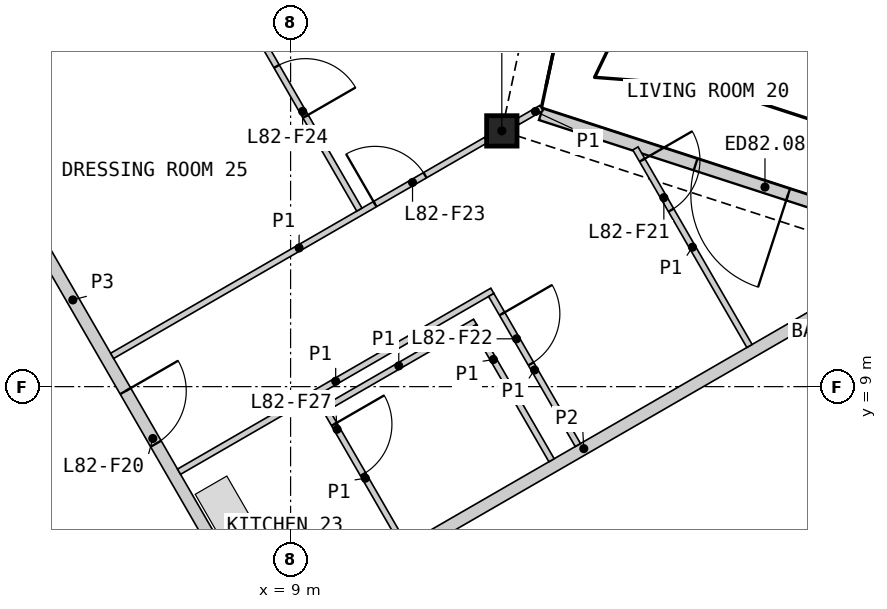
"""IFC4 building model, lengths in metres.
Left out: names, types, materials, properties, quantities, classifications, styles, units other than length and angle.
Written with IfcOpenShell. Run it as: python <this file> out.ifc"""

import sys

from ifc_helpers import new_model, si_unit, direction, frame, frame_2d, origin, origin_2d, place, context, subcontext, project, spatial, polyline, rectangle, hollow_rectangle, outline, extrude, element, fill, save


model = new_model("IFC4")
c1 = context("Model", 3, precision=1e-05, world=origin(), true_north=direction((0.0, 1.0)))
c2 = subcontext(c1, "Body", "Model", "MODEL_VIEW")
j1 = project(units=[si_unit("LENGTHUNIT", "METRE"), si_unit("PLANEANGLEUNIT", "RADIAN")], contexts=[c1])
p1 = place(None, origin())
s1 = spatial("IfcSite", under=j1, at=p1, CompositionType="ELEMENT")
p2 = place(p1, origin())
s2 = spatial("IfcBuilding", under=s1, at=p2, CompositionType="ELEMENT")
p3 = place(p2, frame((0.0, 0.0, 367.8)))
s3 = spatial("IfcBuildingStorey", under=s2, at=p3, CompositionType="ELEMENT", Elevation=367.8)
p4 = place(p3, frame((12.474, 13.206, 0.0), z_axis=(0.0, 0.0, 1.0), x_axis=(1.0, 0.0, 0.0)))
e1 = element("IfcColumn", 1, at=p4, inside=s3, PredefinedType="COLUMN", context=c2, shape_type="SweptSolid", body=[
    extrude(hollow_rectangle(XDim=0.5, YDim=0.5, WallThickness=0.03, at=origin_2d()), origin(), (0.0, 0.0, 1.0), 3.4),
])
p5 = place(p3, frame((19.467, 11.416, 0.0), z_axis=(0.0, 0.0, 1.0), x_axis=(-0.951057706878, 0.309013330114, 0.0)))
e2 = element("IfcWall", 2, at=p5, inside=s3, PredefinedType="SOLIDWALL", context=c2, shape_type="SweptSolid", body=[
    extrude(rectangle(XDim=6.678, YDim=0.2, at=frame_2d((3.339, 0.0))), origin(), (0.0, 0.0, 1.0), 2.634),
])
p6 = place(p5, frame((2.402, 0.0, 0.0)))
e3 = element("IfcOpeningElement", 3, at=p6, cuts=e2, PredefinedType="OPENING", context=c2, shape_type="SweptSolid", body=[
    extrude(rectangle(XDim=1.6, YDim=2.25, at=frame_2d((0.8, 1.125))), frame((0.0, 0.11, 0.0), z_axis=(0.0, -1.0, 0.0), x_axis=(1.0, 0.0, 0.0)), (0.0, 0.0, 1.0), 0.22),
])
p7 = place(p3, origin())
e4 = element("IfcWall", 4, at=p7, inside=s3, PredefinedType="SHEAR", context=c2, shape_type="SweptSolid", body=[
    extrude(outline(polyline([(1.561, 6.097), (3.731, 7.35), (8.231, -0.444), (6.061, -1.697), (5.96, -1.524), (7.952, -0.374), (6.952, 1.358), (4.96, 0.208), (4.861, 0.381), (6.852, 1.531), (5.852, 3.263), (3.861, 2.113), (3.76, 2.287), (5.752, 3.437), (4.752, 5.169), (2.76, 4.019), (2.66, 4.192), (4.652, 5.342), (3.652, 7.074), (1.66, 5.924), (1.561, 6.097)])), origin(), (0.0, 0.0, 1.0), 3.1),
])
p8 = place(p3, frame((8.686, -0.634, 0.0), z_axis=(0.0, 0.0, 1.0), x_axis=(-0.50001836461, 0.866014800712, 0.0)))
e5 = element("IfcWall", 5, at=p8, inside=s3, PredefinedType="SHEAR", context=c2, shape_type="SweptSolid", body=[
    extrude(rectangle(XDim=10.451, YDim=0.6, at=frame_2d((5.225, 0.0))), origin(), (0.0, 0.0, 1.0), 3.1),
])
p9 = place(p3, frame((4.403, 12.185, 0.0), z_axis=(0.0, 0.0, 1.0), x_axis=(0.499992155518, -0.866029932751, 0.0)))
e6 = element("IfcWall", 6, at=p9, inside=s3, PredefinedType="PARTITIONING", context=c2, shape_type="SweptSolid", body=[
    extrude(rectangle(XDim=8.123, YDim=0.2, at=frame_2d((4.062, 0.0))), origin(), (0.0, 0.0, 1.0), 3.1),
])
p10 = place(p9, frame((3.762, 0.0, 0.0)))
e7 = element("IfcOpeningElement", 7, at=p10, cuts=e6, PredefinedType="OPENING", context=c2, shape_type="SweptSolid", body=[
    extrude(rectangle(XDim=1.0, YDim=2.1, at=frame_2d((0.5, 1.05))), frame((0.0, 0.11, 0.0), z_axis=(0.0, -1.0, 0.0), x_axis=(1.0, 0.0, 0.0)), (0.0, 0.0, 1.0), 0.22),
])
p11 = place(p3, frame((8.775, 5.066, 0.0), z_axis=(0.0, 0.0, 1.0), x_axis=(0.866023724155, 0.500002909193, 0.0)))
e8 = element("IfcWall", 8, at=p11, inside=s3, PredefinedType="PARTITIONING", context=c2, shape_type="SweptSolid", body=[
    extrude(rectangle(XDim=11.655, YDim=0.2, at=frame_2d((5.827, 0.0))), origin(), (0.0, 0.0, 1.0), 2.33),
])
p12 = place(p3, frame((3.465, 14.01, 0.0), z_axis=(0.0, 0.0, 1.0), x_axis=(0.866032376801, 0.499987922186, 0.0)))
e9 = element("IfcWall", 9, at=p12, inside=s3, PredefinedType="PARTITIONING", context=c2, shape_type="SweptSolid", body=[
    extrude(rectangle(XDim=11.782, YDim=0.1, at=frame_2d((5.891, 0.0))), origin(), (0.0, 0.0, 1.0), 2.33),
])
p13 = place(p12, frame((6.67, 0.0, 0.0)))
e10 = element("IfcOpeningElement", 10, at=p13, cuts=e9, PredefinedType="OPENING", context=c2, shape_type="SweptSolid", body=[
    extrude(rectangle(XDim=0.95, YDim=2.1, at=frame_2d((0.475, 1.05))), frame((0.0, 0.06, 0.0), z_axis=(0.0, -1.0, 0.0), x_axis=(1.0, 0.0, 0.0)), (0.0, 0.0, 1.0), 0.12),
])
p14 = place(p3, frame((6.065, 9.506, 0.0), z_axis=(0.0, 0.0, 1.0), x_axis=(0.866018949465, 0.500011179042, 0.0)))
e11 = element("IfcWall", 11, at=p14, inside=s3, PredefinedType="PARTITIONING", context=c2, shape_type="SweptSolid", body=[
    extrude(rectangle(XDim=7.1, YDim=0.1, at=frame_2d((3.55, 0.0))), origin(), (0.0, 0.0, 1.0), 2.33),
])
p15 = place(p14, frame((4.992, 0.0, 0.0)))
e12 = element("IfcOpeningElement", 12, at=p15, cuts=e11, PredefinedType="OPENING", context=c2, shape_type="SweptSolid", body=[
    extrude(rectangle(XDim=0.95, YDim=2.1, at=frame_2d((0.475, 1.05))), frame((0.0, 0.06, 0.0), z_axis=(0.0, -1.0, 0.0), x_axis=(1.0, 0.0, 0.0)), (0.0, 0.0, 1.0), 0.12),
])
p16 = place(p3, frame((7.165, 7.601, 0.0), z_axis=(0.0, 0.0, 1.0), x_axis=(0.866017493347, 0.500013701029, 0.0)))
e13 = element("IfcWall", 13, at=p16, inside=s3, PredefinedType="PARTITIONING", context=c2, shape_type="SweptSolid", body=[
    extrude(rectangle(XDim=5.95, YDim=0.1, at=frame_2d((2.975, 0.0))), origin(), (0.0, 0.0, 1.0), 2.33),
])
p17 = place(p3, frame((7.581, 16.328, 0.0), z_axis=(0.0, 0.0, 1.0), x_axis=(0.500005610874, -0.86602216432, 0.0)))
e14 = element("IfcWall", 14, at=p17, inside=s3, PredefinedType="PARTITIONING", context=c2, shape_type="SweptSolid", body=[
    extrude(rectangle(XDim=5.1, YDim=0.1, at=frame_2d((2.55, 0.0))), origin(), (0.0, 0.0, 1.0), 2.33),
])
p18 = place(p17, frame((2.379, 0.0, 0.0)))
e15 = element("IfcOpeningElement", 15, at=p18, cuts=e14, PredefinedType="OPENING", context=c2, shape_type="SweptSolid", body=[
    extrude(rectangle(XDim=0.95, YDim=2.1, at=frame_2d((0.475, 1.05))), frame((0.0, 0.06, 0.0), z_axis=(0.0, -1.0, 0.0), x_axis=(1.0, 0.0, 0.0)), (0.0, 0.0, 1.0), 0.12),
])
p19 = place(p3, frame((14.671, 12.918, 0.0), z_axis=(0.0, 0.0, 1.0), x_axis=(0.499981580887, -0.866036037803, 0.0)))
e16 = element("IfcWall", 16, at=p19, inside=s3, PredefinedType="PARTITIONING", context=c2, shape_type="SweptSolid", body=[
    extrude(rectangle(XDim=3.752, YDim=0.1, at=frame_2d((1.876, 0.0))), origin(), (0.0, 0.0, 1.0), 2.33),
])
p20 = place(p19, frame((0.222, 0.0, 0.0)))
e17 = element("IfcOpeningElement", 17, at=p20, cuts=e16, PredefinedType="OPENING", context=c2, shape_type="SweptSolid", body=[
    extrude(rectangle(XDim=0.95, YDim=2.1, at=frame_2d((0.475, 1.05))), frame((0.0, 0.06, 0.0), z_axis=(0.0, -1.0, 0.0), x_axis=(1.0, 0.0, 0.0)), (0.0, 0.0, 1.0), 0.12),
])
p21 = place(p3, frame((12.3, 10.508, 0.0), z_axis=(0.0, 0.0, 1.0), x_axis=(0.499999279071, -0.866025820012, 0.0)))
e18 = element("IfcWall", 18, at=p21, inside=s3, PredefinedType="PARTITIONING", context=c2, shape_type="SweptSolid", body=[
    extrude(rectangle(XDim=2.85, YDim=0.1, at=frame_2d((1.425, 0.0))), origin(), (0.0, 0.0, 1.0), 2.33),
])
p22 = place(p21, frame((0.358, 0.0, 0.0)))
e19 = element("IfcOpeningElement", 19, at=p22, cuts=e18, PredefinedType="OPENING", context=c2, shape_type="SweptSolid", body=[
    extrude(rectangle(XDim=0.95, YDim=2.1, at=frame_2d((0.475, 1.05))), frame((0.0, 0.06, 0.0), z_axis=(0.0, -1.0, 0.0), x_axis=(1.0, 0.0, 0.0)), (0.0, 0.0, 1.0), 0.12),
])
p23 = place(p3, frame((9.523, 8.616, 0.0), z_axis=(0.0, 0.0, 1.0), x_axis=(0.866032775405, 0.499987231761, 0.0)))
e20 = element("IfcWall", 20, at=p23, inside=s3, PredefinedType="PARTITIONING", context=c2, shape_type="SweptSolid", body=[
    extrude(rectangle(XDim=2.9, YDim=0.1, at=frame_2d((1.45, 0.0))), origin(), (0.0, 0.0, 1.0), 2.33),
])
p24 = place(p3, frame((12.017, 9.998, 0.0), z_axis=(0.0, 0.0, 1.0), x_axis=(0.499948979701, -0.866054858364, 0.0)))
e21 = element("IfcWall", 21, at=p24, inside=s3, PredefinedType="PARTITIONING", context=c2, shape_type="SweptSolid", body=[
    extrude(rectangle(XDim=2.55, YDim=0.1, at=frame_2d((1.275, 0.0))), origin(), (0.0, 0.0, 1.0), 2.33),
])
p25 = place(p3, frame((9.592, 8.598, 0.0), z_axis=(0.0, 0.0, 1.0), x_axis=(0.499990435942, -0.866030925526, 0.0)))
e22 = element("IfcWall", 22, at=p25, inside=s3, PredefinedType="PARTITIONING", context=c2, shape_type="SweptSolid", body=[
    extrude(rectangle(XDim=2.55, YDim=0.1, at=frame_2d((1.275, 0.0))), origin(), (0.0, 0.0, 1.0), 2.33),
])
p26 = place(p25, frame((0.25, 0.0, 0.0)))
e23 = element("IfcOpeningElement", 23, at=p26, cuts=e22, PredefinedType="OPENING", context=c2, shape_type="SweptSolid", body=[
    extrude(rectangle(XDim=0.95, YDim=2.1, at=frame_2d((0.475, 1.05))), frame((0.0, 0.06, 0.0), z_axis=(0.0, -1.0, 0.0), x_axis=(1.0, 0.0, 0.0)), (0.0, 0.0, 1.0), 0.12),
])
p27 = place(p3, frame((12.734, 13.356, 0.0), z_axis=(0.0, 0.0, 1.0), x_axis=(0.865870279271, 0.500268587336, 0.0)))
e24 = element("IfcWall", 24, at=p27, inside=s3, PredefinedType="PARTITIONING", context=c2, shape_type="SweptSolid", body=[
    extrude(rectangle(XDim=0.451, YDim=0.1, at=frame_2d((0.226, 0.0))), origin(), (0.0, 0.0, 1.0), 2.33),
])
p28 = place(p6, origin())
e25 = element("IfcDoor", 25, at=p28, inside=s3, OperationType="DOUBLE_DOOR_SINGLE_SWING", PredefinedType="DOOR", context=c2, shape_type="SweptSolid", body=[
    extrude(rectangle(XDim=1.6, YDim=2.25, at=frame_2d((0.8, 1.125))), frame((0.0, 0.025, 0.0), z_axis=(0.0, -1.0, 0.0), x_axis=(1.0, 0.0, 0.0)), (0.0, 0.0, 1.0), 0.05),
])
fill(e3, e25)
p29 = place(p10, origin())
e26 = element("IfcDoor", 26, at=p29, inside=s3, OperationType="SINGLE_SWING_LEFT", PredefinedType="DOOR", context=c2, shape_type="SweptSolid", body=[
    extrude(rectangle(XDim=1.0, YDim=2.1, at=frame_2d((0.5, 1.05))), frame((0.0, 0.025, 0.0), z_axis=(0.0, -1.0, 0.0), x_axis=(1.0, 0.0, 0.0)), (0.0, 0.0, 1.0), 0.05),
])
fill(e7, e26)
p30 = place(p20, origin())
e27 = element("IfcDoor", 27, at=p30, inside=s3, OperationType="SINGLE_SWING_LEFT", PredefinedType="DOOR", context=c2, shape_type="SweptSolid", body=[
    extrude(rectangle(XDim=0.95, YDim=2.1, at=frame_2d((0.475, 1.05))), frame((0.0, 0.025, 0.0), z_axis=(0.0, -1.0, 0.0), x_axis=(1.0, 0.0, 0.0)), (0.0, 0.0, 1.0), 0.05),
])
fill(e17, e27)
p31 = place(p22, origin())
e28 = element("IfcDoor", 28, at=p31, inside=s3, OperationType="SINGLE_SWING_LEFT", PredefinedType="DOOR", context=c2, shape_type="SweptSolid", body=[
    extrude(rectangle(XDim=0.95, YDim=2.1, at=frame_2d((0.475, 1.05))), frame((0.0, 0.025, 0.0), z_axis=(0.0, -1.0, 0.0), x_axis=(1.0, 0.0, 0.0)), (0.0, 0.0, 1.0), 0.05),
])
fill(e19, e28)
p32 = place(p15, origin())
e29 = element("IfcDoor", 29, at=p32, inside=s3, OperationType="SINGLE_SWING_LEFT", PredefinedType="DOOR", context=c2, shape_type="SweptSolid", body=[
    extrude(rectangle(XDim=0.95, YDim=2.1, at=frame_2d((0.475, 1.05))), frame((0.0, 0.025, 0.0), z_axis=(0.0, -1.0, 0.0), x_axis=(1.0, 0.0, 0.0)), (0.0, 0.0, 1.0), 0.05),
])
fill(e12, e29)
p33 = place(p18, origin())
e30 = element("IfcDoor", 30, at=p33, inside=s3, OperationType="SINGLE_SWING_RIGHT", PredefinedType="DOOR", context=c2, shape_type="SweptSolid", body=[
    extrude(rectangle(XDim=0.95, YDim=2.1, at=frame_2d((0.475, 1.05))), frame((0.0, 0.025, 0.0), z_axis=(0.0, -1.0, 0.0), x_axis=(1.0, 0.0, 0.0)), (0.0, 0.0, 1.0), 0.05),
])
fill(e15, e30)
p34 = place(p26, origin())
e31 = element("IfcDoor", 31, at=p34, inside=s3, OperationType="SINGLE_SWING_LEFT", PredefinedType="DOOR", context=c2, shape_type="SweptSolid", body=[
    extrude(rectangle(XDim=0.95, YDim=2.1, at=frame_2d((0.475, 1.05))), frame((0.0, 0.025, 0.0), z_axis=(0.0, -1.0, 0.0), x_axis=(1.0, 0.0, 0.0)), (0.0, 0.0, 1.0), 0.05),
])
fill(e23, e31)
save(model, sys.argv[1])
